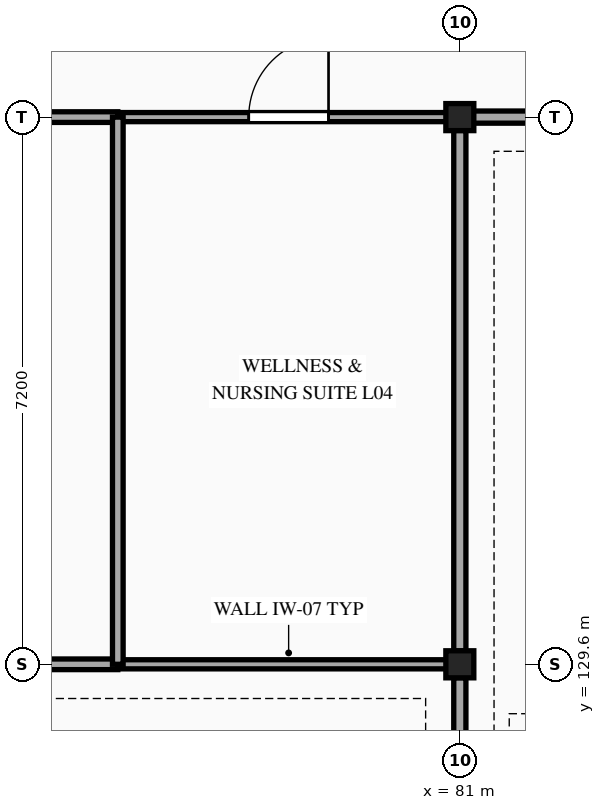
"""IFC4 building model, lengths in metres.
Left out: names, types, materials, properties, quantities, classifications, styles, units other than length and angle.
Written with IfcOpenShell. Run it as: python <this file> out.ifc"""

import sys

from ifc_helpers import new_model, si_unit, direction, frame, frame_2d, origin, origin_2d, place, context, subcontext, project, spatial, rectangle, i_section, extrude, element, fill, save


model = new_model("IFC4")
c1 = context("Model", 3, precision=1e-05, world=origin(), true_north=direction((0.0, 1.0)))
c2 = subcontext(c1, "Body", "Model", "MODEL_VIEW")
j1 = project(units=[si_unit("LENGTHUNIT", "METRE"), si_unit("PLANEANGLEUNIT", "RADIAN")], contexts=[c1])
p1 = place(None, origin())
s1 = spatial("IfcSite", under=j1, at=p1, CompositionType="ELEMENT")
p2 = place(p1, origin())
s2 = spatial("IfcBuilding", under=s1, at=p2, CompositionType="ELEMENT")
p3 = place(p2, frame((0.0, 0.0, 19.8)))
s3 = spatial("IfcBuildingStorey", under=s2, at=p3, CompositionType="ELEMENT", Elevation=19.8)
for number, where, z_axis, x_axis in (
    (1, (81.0, 129.6, 0.0), (0.0, 0.0, 1.0), (1.0, 0.0, 0.0)),
    (2, (81.0, 136.8, 0.0), (0.0, 0.0, 1.0), (1.0, 0.0, 0.0)),
):
    element("IfcColumn", number, at=place(p3, frame(where, z_axis=z_axis, x_axis=x_axis)), inside=s3, PredefinedType="COLUMN", context=c2, shape_type="SweptSolid", body=[
        extrude(i_section(OverallWidth=0.368, OverallDepth=0.356, WebThickness=0.011, FlangeThickness=0.018, at=origin_2d()), origin(), (0.0, 0.0, 1.0), 4.5),
    ])
p4 = place(p3, frame((72.005, 129.6, 0.0), z_axis=(0.0, 0.0, 1.0), x_axis=(1.0, 0.0, 0.0)))
e3 = element("IfcWall", 3, at=p4, inside=s3, PredefinedType="PARTITIONING", context=c2, shape_type="SweptSolid", body=[
    extrude(rectangle(XDim=4.495, YDim=0.14, at=frame_2d((2.248, 0.0))), origin(), (0.0, 0.0, 1.0), 3.588),
])
p5 = place(p3, frame((76.5, 129.6, 0.0), z_axis=(0.0, 0.0, 1.0), x_axis=(1.0, 0.0, 0.0)))
e4 = element("IfcWall", 4, at=p5, inside=s3, PredefinedType="PARTITIONING", context=c2, shape_type="SweptSolid", body=[
    extrude(rectangle(XDim=4.495, YDim=0.12, at=frame_2d((2.248, 0.0))), origin(), (0.0, 0.0, 1.0), 3.588),
])
p6 = place(p3, frame((72.005, 136.8, 0.0), z_axis=(0.0, 0.0, 1.0), x_axis=(1.0, 0.0, 0.0)))
e5 = element("IfcWall", 5, at=p6, inside=s3, PredefinedType="PARTITIONING", context=c2, shape_type="SweptSolid", body=[
    extrude(rectangle(XDim=4.495, YDim=0.14, at=frame_2d((2.248, 0.0))), origin(), (0.0, 0.0, 1.0), 3.648),
])
p7 = place(p6, frame((1.772, 0.0, 0.0)))
e6 = element("IfcOpeningElement", 6, at=p7, cuts=e5, PredefinedType="OPENING", context=c2, shape_type="SweptSolid", body=[
    extrude(rectangle(XDim=0.95, YDim=2.1, at=frame_2d((0.475, 1.05))), frame((0.0, 0.08, 0.0), z_axis=(0.0, -1.0, 0.0), x_axis=(1.0, 0.0, 0.0)), (0.0, 0.0, 1.0), 0.16),
])
p8 = place(p3, frame((76.5, 136.8, 0.0), z_axis=(0.0, 0.0, 1.0), x_axis=(1.0, 0.0, 0.0)))
e7 = element("IfcWall", 7, at=p8, inside=s3, PredefinedType="PARTITIONING", context=c2, shape_type="SweptSolid", body=[
    extrude(rectangle(XDim=4.495, YDim=0.12, at=frame_2d((2.248, 0.0))), origin(), (0.0, 0.0, 1.0), 3.648),
])
p9 = place(p8, frame((1.722, 0.0, 0.0)))
e8 = element("IfcOpeningElement", 8, at=p9, cuts=e7, PredefinedType="OPENING", context=c2, shape_type="SweptSolid", body=[
    extrude(rectangle(XDim=1.05, YDim=2.15, at=frame_2d((0.525, 1.075))), frame((0.0, 0.07, 0.0), z_axis=(0.0, -1.0, 0.0), x_axis=(1.0, 0.0, 0.0)), (0.0, 0.0, 1.0), 0.14),
])
p10 = place(p3, frame((81.005, 136.8, 0.0), z_axis=(0.0, 0.0, 1.0), x_axis=(1.0, 0.0, 0.0)))
e9 = element("IfcWall", 9, at=p10, inside=s3, PredefinedType="PARTITIONING", context=c2, shape_type="SweptSolid", body=[
    extrude(rectangle(XDim=8.99, YDim=0.16, at=frame_2d((4.495, 0.0))), origin(), (0.0, 0.0, 1.0), 3.648),
])
p11 = place(p10, frame((3.695, 0.0, 0.0)))
e10 = element("IfcOpeningElement", 10, at=p11, cuts=e9, PredefinedType="OPENING", context=c2, shape_type="SweptSolid", body=[
    extrude(rectangle(XDim=1.6, YDim=2.2, at=frame_2d((0.8, 1.1))), frame((0.0, 0.09, 0.0), z_axis=(0.0, -1.0, 0.0), x_axis=(1.0, 0.0, 0.0)), (0.0, 0.0, 1.0), 0.18),
])
p12 = place(p3, frame((76.5, 129.6, 0.0), z_axis=(0.0, 0.0, 1.0), x_axis=(0.0, 1.0, 0.0)))
e11 = element("IfcWall", 11, at=p12, inside=s3, PredefinedType="PARTITIONING", context=c2, shape_type="SweptSolid", body=[
    extrude(rectangle(XDim=7.2, YDim=0.14, at=frame_2d((3.6, 0.0))), origin(), (0.0, 0.0, 1.0), 3.588),
])
for number, where, z_axis, x_axis in (
    (12, (81.0, 122.576, 0.0), (0.0, 0.0, 1.0), (0.0, 1.0, 0.0)),
    (13, (81.0, 129.776, 0.0), (0.0, 0.0, 1.0), (0.0, 1.0, 0.0)),
):
    element("IfcWall", number, at=place(p3, frame(where, z_axis=z_axis, x_axis=x_axis)), inside=s3, PredefinedType="PARTITIONING", context=c2, shape_type="SweptSolid", body=[
        extrude(rectangle(XDim=6.848, YDim=0.16, at=frame_2d((3.424, 0.0))), origin(), (0.0, 0.0, 1.0), 3.588),
    ])
p13 = place(p9, origin())
e14 = element("IfcDoor", 14, at=p13, inside=s3, OperationType="SINGLE_SWING_RIGHT", PredefinedType="DOOR", context=c2, shape_type="SweptSolid", body=[
    extrude(rectangle(XDim=1.05, YDim=2.15, at=frame_2d((0.525, 1.075))), frame((0.0, 0.025, 0.0), z_axis=(0.0, -1.0, 0.0), x_axis=(1.0, 0.0, 0.0)), (0.0, 0.0, 1.0), 0.05),
])
fill(e8, e14)
save(model, sys.argv[1])
